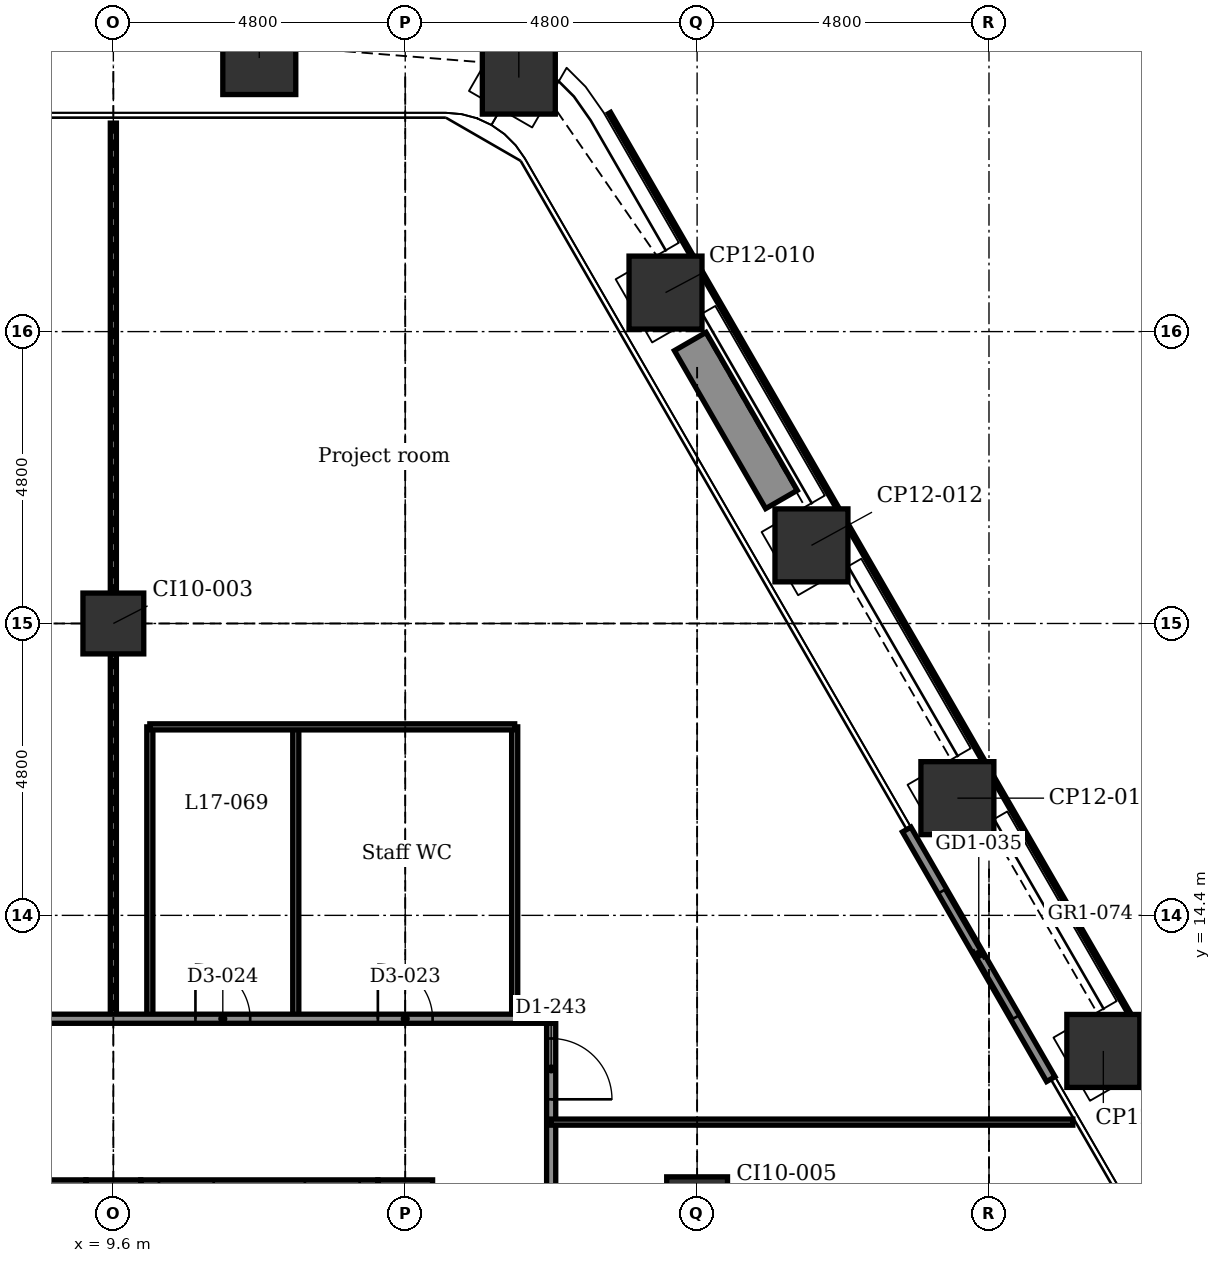
"""IFC4 building model, lengths in metres.
Left out: names, types, materials, properties, quantities, classifications, styles, units other than length and angle.
Written with IfcOpenShell. Run it as: python <this file> out.ifc"""

import sys

from ifc_helpers import new_model, si_unit, direction, frame, frame_2d, origin, origin_2d, place, context, subcontext, project, spatial, rectangle, extrude, element, fill, save


model = new_model("IFC4")
c1 = context("Model", 3, precision=1e-05, world=origin(), true_north=direction((0.0, 1.0)))
c2 = subcontext(c1, "Body", "Model", "MODEL_VIEW")
j1 = project(units=[si_unit("LENGTHUNIT", "METRE"), si_unit("PLANEANGLEUNIT", "RADIAN")], contexts=[c1])
p1 = place(None, origin())
s1 = spatial("IfcSite", under=j1, at=p1, CompositionType="ELEMENT")
p2 = place(p1, origin())
s2 = spatial("IfcBuilding", under=s1, at=p2, CompositionType="ELEMENT")
p3 = place(p2, frame((0.0, 0.0, 91.4)))
s3 = spatial("IfcBuildingStorey", under=s2, at=p3, CompositionType="ELEMENT", Elevation=91.4)
for number, where, z_axis, x_axis in (
    (1, (12.0, 28.499, -0.2), (0.0, 0.0, 1.0), (1.0, 0.0, 0.0)),
    (2, (16.268, 28.177, -0.2), (0.0, 0.0, 1.0), (0.5, 0.866, 0.0)),
    (3, (18.68, 24.642, -0.2), (0.0, 0.0, 1.0), (0.866, 0.5, 0.0)),
    (4, (21.08, 20.485, -0.2), (0.0, 0.0, 1.0), (0.866, 0.5, 0.0)),
    (5, (23.48, 16.328, -0.2), (0.0, 0.0, 1.0), (0.866, 0.5, 0.0)),
    (6, (25.88, 12.171, -0.2), (0.0, 0.0, 1.0), (0.866, 0.5, 0.0)),
):
    element("IfcColumn", number, at=place(p3, frame(where, z_axis=z_axis, x_axis=x_axis)), inside=s3, PredefinedType="COLUMN", context=c2, shape_type="SweptSolid", body=[
        extrude(rectangle(XDim=1.2, YDim=1.2, at=origin_2d()), origin(), (0.0, 0.0, 1.0), 4.5),
    ])
for number, where, z_axis, x_axis in (
    (7, (9.6, 19.2, -0.2), (0.0, 0.0, 1.0), (1.0, 0.0, 0.0)),
    (8, (19.2, 9.6, -0.2), (0.0, 0.0, 1.0), (1.0, 0.0, 0.0)),
):
    element("IfcColumn", number, at=place(p3, frame(where, z_axis=z_axis, x_axis=x_axis)), inside=s3, PredefinedType="COLUMN", context=c2, shape_type="SweptSolid", body=[
        extrude(rectangle(XDim=1.0, YDim=1.0, at=origin_2d()), origin(), (0.0, 0.0, 1.0), 4.5),
    ])
p4 = place(p3, frame((-5.25, 9.6, -0.2), z_axis=(0.0, 0.0, 1.0), x_axis=(1.0, 0.0, 0.0)))
e9 = element("IfcWall", 9, at=p4, inside=s3, PredefinedType="SHEAR", context=c2, shape_type="SweptSolid", body=[
    extrude(rectangle(XDim=14.4, YDim=0.9, at=frame_2d((7.2, 0.0))), origin(), (0.0, 0.0, 1.0), 4.5),
])
p5 = place(p4, frame((9.35, 0.0, 0.2)))
e10 = element("IfcOpeningElement", 10, at=p5, cuts=e9, PredefinedType="OPENING", context=c2, shape_type="SweptSolid", body=[
    extrude(rectangle(XDim=1.4, YDim=2.1, at=frame_2d((0.7, 1.05))), frame((0.0, 0.46, 0.0), z_axis=(0.0, -1.0, 0.0), x_axis=(1.0, 0.0, 0.0)), (0.0, 0.0, 1.0), 0.92),
])
p6 = place(p3, frame((10.05, 9.6, -0.2), z_axis=(0.0, 0.0, 1.0), x_axis=(1.0, 0.0, 0.0)))
e11 = element("IfcWall", 11, at=p6, inside=s3, PredefinedType="SHEAR", context=c2, shape_type="SweptSolid", body=[
    extrude(rectangle(XDim=3.9, YDim=0.9, at=frame_2d((1.95, 0.0))), origin(), (0.0, 0.0, 1.0), 4.5),
])
p7 = place(p6, frame((0.3, 0.0, 0.2)))
e12 = element("IfcOpeningElement", 12, at=p7, cuts=e11, PredefinedType="OPENING", context=c2, shape_type="SweptSolid", body=[
    extrude(rectangle(XDim=0.9, YDim=2.1, at=frame_2d((0.45, 1.05))), frame((0.0, 0.46, 0.0), z_axis=(0.0, -1.0, 0.0), x_axis=(1.0, 0.0, 0.0)), (0.0, 0.0, 1.0), 0.92),
])
p8 = place(p6, frame((2.7, 0.0, 0.2)))
e13 = element("IfcOpeningElement", 13, at=p8, cuts=e11, PredefinedType="OPENING", context=c2, shape_type="SweptSolid", body=[
    extrude(rectangle(XDim=0.9, YDim=2.1, at=frame_2d((0.45, 1.05))), frame((0.0, 0.46, 0.0), z_axis=(0.0, -1.0, 0.0), x_axis=(1.0, 0.0, 0.0)), (0.0, 0.0, 1.0), 0.92),
])
p9 = place(p3, frame((9.6, -10.15, -0.2), z_axis=(0.0, 0.0, 1.0), x_axis=(0.0, 1.0, 0.0)))
e14 = element("IfcWall", 14, at=p9, inside=s3, PredefinedType="SHEAR", context=c2, shape_type="SweptSolid", body=[
    extrude(rectangle(XDim=20.2, YDim=0.9, at=frame_2d((10.1, 0.0))), origin(), (0.0, 0.0, 1.0), 4.5),
])
p10 = place(p3, frame((14.4, -10.05, -0.2), z_axis=(0.0, 0.0, 1.0), x_axis=(0.0, 1.0, 0.0)))
e15 = element("IfcWall", 15, at=p10, inside=s3, PredefinedType="SHEAR", context=c2, shape_type="SweptSolid", body=[
    extrude(rectangle(XDim=20.1, YDim=0.9, at=frame_2d((10.05, 0.0))), origin(), (0.0, 0.0, 1.0), 4.5),
])
p11 = place(p10, frame((3.5, 0.0, 0.2)))
e16 = element("IfcOpeningElement", 16, at=p11, cuts=e15, PredefinedType="OPENING", context=c2, shape_type="SweptSolid", body=[
    extrude(rectangle(XDim=1.1, YDim=2.1, at=frame_2d((0.55, 1.05))), frame((0.0, 0.46, 0.0), z_axis=(0.0, -1.0, 0.0), x_axis=(1.0, 0.0, 0.0)), (0.0, 0.0, 1.0), 0.92),
])
p12 = place(p10, frame((5.9, 0.0, 0.2)))
e17 = element("IfcOpeningElement", 17, at=p12, cuts=e15, PredefinedType="OPENING", context=c2, shape_type="SweptSolid", body=[
    extrude(rectangle(XDim=1.1, YDim=2.1, at=frame_2d((0.55, 1.05))), frame((0.0, 0.46, 0.0), z_axis=(0.0, -1.0, 0.0), x_axis=(1.0, 0.0, 0.0)), (0.0, 0.0, 1.0), 0.92),
])
p13 = place(p10, frame((8.3, 0.0, 0.2)))
e18 = element("IfcOpeningElement", 18, at=p13, cuts=e15, PredefinedType="OPENING", context=c2, shape_type="SweptSolid", body=[
    extrude(rectangle(XDim=1.1, YDim=2.1, at=frame_2d((0.55, 1.05))), frame((0.0, 0.46, 0.0), z_axis=(0.0, -1.0, 0.0), x_axis=(1.0, 0.0, 0.0)), (0.0, 0.0, 1.0), 0.92),
])
p14 = place(p10, frame((10.7, 0.0, 0.2)))
e19 = element("IfcOpeningElement", 19, at=p14, cuts=e15, PredefinedType="OPENING", context=c2, shape_type="SweptSolid", body=[
    extrude(rectangle(XDim=1.1, YDim=2.1, at=frame_2d((0.55, 1.05))), frame((0.0, 0.46, 0.0), z_axis=(0.0, -1.0, 0.0), x_axis=(1.0, 0.0, 0.0)), (0.0, 0.0, 1.0), 0.92),
])
p15 = place(p3, frame((22.647, 15.812, 0.0), z_axis=(0.0, 0.0, 1.0), x_axis=(0.499978080042, -0.866038058908, 0.0)))
e20 = element("IfcWall", 20, at=p15, inside=s3, PredefinedType="PARTITIONING", context=c2, shape_type="SweptSolid", body=[
    extrude(rectangle(XDim=4.74, YDim=0.16, at=frame_2d((2.37, 0.0))), origin(), (0.0, 0.0, 1.0), 4.3),
])
p16 = place(p15, frame((1.17, 0.0, 0.0)))
e21 = element("IfcOpeningElement", 21, at=p16, cuts=e20, PredefinedType="OPENING", context=c2, shape_type="SweptSolid", body=[
    extrude(rectangle(XDim=2.4, YDim=2.4, at=frame_2d((1.2, 1.2))), frame((0.0, 0.09, 0.0), z_axis=(0.0, -1.0, 0.0), x_axis=(1.0, 0.0, 0.0)), (0.0, 0.0, 1.0), 0.18),
])
p17 = place(p3, frame((19.087, 23.837, 0.0), z_axis=(0.0, 0.0, 1.0), x_axis=(0.499990139034, -0.866031096941, 0.0)))
e22 = element("IfcWall", 22, at=p17, inside=s3, PredefinedType="USERDEFINED", context=c2, shape_type="SweptSolid", body=[
    extrude(rectangle(XDim=3.0, YDim=0.6, at=frame_2d((1.5, 0.0))), origin(), (0.0, 0.0, 1.0), 0.7),
])
p18 = place(p3, frame((16.8, 3.95, 0.0), z_axis=(0.0, 0.0, 1.0), x_axis=(0.0, 1.0, 0.0)))
e23 = element("IfcWall", 23, at=p18, inside=s3, PredefinedType="PARTITIONING", context=c2, shape_type="SweptSolid", body=[
    extrude(rectangle(XDim=8.75, YDim=0.15, at=frame_2d((4.375, 0.0))), origin(), (0.0, 0.0, 1.0), 4.3),
])
p19 = place(p18, frame((7.425, 0.0, 0.0)))
e24 = element("IfcOpeningElement", 24, at=p19, cuts=e23, PredefinedType="OPENING", context=c2, shape_type="SweptSolid", body=[
    extrude(rectangle(XDim=1.0, YDim=2.1, at=frame_2d((0.5, 1.05))), frame((0.0, 0.085, 0.0), z_axis=(0.0, -1.0, 0.0), x_axis=(1.0, 0.0, 0.0)), (0.0, 0.0, 1.0), 0.17),
])
p20 = place(p18, frame((0.885, 0.0, 0.0)))
e25 = element("IfcOpeningElement", 25, at=p20, cuts=e23, PredefinedType="OPENING", context=c2, shape_type="SweptSolid", body=[
    extrude(rectangle(XDim=1.0, YDim=2.1, at=frame_2d((0.5, 1.05))), frame((0.0, 0.085, 0.0), z_axis=(0.0, -1.0, 0.0), x_axis=(1.0, 0.0, 0.0)), (0.0, 0.0, 1.0), 0.17),
])
for number, where, z_axis, x_axis in (
    (26, (16.2, 12.7, 0.0), (0.0, 0.0, 1.0), (0.0, 1.0, 0.0)),
    (27, (12.6, 12.7, 0.0), (0.0, 0.0, 1.0), (0.0, 1.0, 0.0)),
    (28, (10.2, 12.7, 0.0), (0.0, 0.0, 1.0), (0.0, 1.0, 0.0)),
):
    element("IfcWall", number, at=place(p3, frame(where, z_axis=z_axis, x_axis=x_axis)), inside=s3, PredefinedType="PARTITIONING", context=c2, shape_type="SweptSolid", body=[
        extrude(rectangle(XDim=4.8, YDim=0.1, at=frame_2d((2.4, 0.0))), origin(), (0.0, 0.0, 1.0), 4.3),
    ])
p21 = place(p3, frame((9.6, 12.7, 0.0), z_axis=(0.0, 0.0, 1.0), x_axis=(0.0, 1.0, 0.0)))
e29 = element("IfcWall", 29, at=p21, inside=s3, PredefinedType="PARTITIONING", context=c2, shape_type="SweptSolid", body=[
    extrude(rectangle(XDim=6.0, YDim=0.1, at=frame_2d((3.0, 0.0))), origin(), (0.0, 0.0, 1.0), 3.843),
])
p22 = place(p3, frame((9.6, 19.7, 0.0), z_axis=(0.0, 0.0, 1.0), x_axis=(0.0, 1.0, 0.0)))
e30 = element("IfcWall", 30, at=p22, inside=s3, PredefinedType="PARTITIONING", context=c2, shape_type="SweptSolid", body=[
    extrude(rectangle(XDim=7.729, YDim=0.1, at=frame_2d((3.864, 0.0))), origin(), (0.0, 0.0, 1.0), 3.843),
])
p23 = place(p3, frame((16.8, 11.0, 0.0), z_axis=(0.0, 0.0, 1.0), x_axis=(1.0, 0.0, 0.0)))
e31 = element("IfcWall", 31, at=p23, inside=s3, PredefinedType="PARTITIONING", context=c2, shape_type="SweptSolid", body=[
    extrude(rectangle(XDim=8.578, YDim=0.1, at=frame_2d((4.289, 0.0))), origin(), (0.0, 0.0, 1.0), 4.3),
])
p24 = place(p3, frame((-16.8, 12.7, 0.0), z_axis=(0.0, 0.0, 1.0), x_axis=(1.0, 0.0, 0.0)))
e32 = element("IfcWall", 32, at=p24, inside=s3, PredefinedType="PARTITIONING", context=c2, shape_type="SweptSolid", body=[
    extrude(rectangle(XDim=33.6, YDim=0.15, at=frame_2d((16.8, 0.0))), origin(), (0.0, 0.0, 1.0), 4.3),
])
p25 = place(p24, frame((0.625, 0.0, 0.0)))
e33 = element("IfcOpeningElement", 33, at=p25, cuts=e32, PredefinedType="OPENING", context=c2, shape_type="SweptSolid", body=[
    extrude(rectangle(XDim=1.0, YDim=2.1, at=frame_2d((0.5, 1.05))), frame((0.0, 0.085, 0.0), z_axis=(0.0, -1.0, 0.0), x_axis=(1.0, 0.0, 0.0)), (0.0, 0.0, 1.0), 0.17),
])
p26 = place(p24, frame((4.3, 0.0, 0.0)))
e34 = element("IfcOpeningElement", 34, at=p26, cuts=e32, PredefinedType="OPENING", context=c2, shape_type="SweptSolid", body=[
    extrude(rectangle(XDim=1.0, YDim=2.1, at=frame_2d((0.5, 1.05))), frame((0.0, 0.085, 0.0), z_axis=(0.0, -1.0, 0.0), x_axis=(1.0, 0.0, 0.0)), (0.0, 0.0, 1.0), 0.17),
])
p27 = place(p24, frame((10.3, 0.0, 0.0)))
e35 = element("IfcOpeningElement", 35, at=p27, cuts=e32, PredefinedType="OPENING", context=c2, shape_type="SweptSolid", body=[
    extrude(rectangle(XDim=1.0, YDim=2.1, at=frame_2d((0.5, 1.05))), frame((0.0, 0.085, 0.0), z_axis=(0.0, -1.0, 0.0), x_axis=(1.0, 0.0, 0.0)), (0.0, 0.0, 1.0), 0.17),
])
p28 = place(p24, frame((14.975, 0.0, 0.0)))
e36 = element("IfcOpeningElement", 36, at=p28, cuts=e32, PredefinedType="OPENING", context=c2, shape_type="SweptSolid", body=[
    extrude(rectangle(XDim=1.0, YDim=2.1, at=frame_2d((0.5, 1.05))), frame((0.0, 0.085, 0.0), z_axis=(0.0, -1.0, 0.0), x_axis=(1.0, 0.0, 0.0)), (0.0, 0.0, 1.0), 0.17),
])
p29 = place(p24, frame((18.7, 0.0, 0.0)))
e37 = element("IfcOpeningElement", 37, at=p29, cuts=e32, PredefinedType="OPENING", context=c2, shape_type="SweptSolid", body=[
    extrude(rectangle(XDim=1.0, YDim=2.1, at=frame_2d((0.5, 1.05))), frame((0.0, 0.085, 0.0), z_axis=(0.0, -1.0, 0.0), x_axis=(1.0, 0.0, 0.0)), (0.0, 0.0, 1.0), 0.17),
])
p30 = place(p24, frame((22.485, 0.0, 0.0)))
e38 = element("IfcOpeningElement", 38, at=p30, cuts=e32, PredefinedType="OPENING", context=c2, shape_type="SweptSolid", body=[
    extrude(rectangle(XDim=1.0, YDim=2.1, at=frame_2d((0.5, 1.05))), frame((0.0, 0.085, 0.0), z_axis=(0.0, -1.0, 0.0), x_axis=(1.0, 0.0, 0.0)), (0.0, 0.0, 1.0), 0.17),
])
p31 = place(p24, frame((30.75, 0.0, 0.0)))
e39 = element("IfcOpeningElement", 39, at=p31, cuts=e32, PredefinedType="OPENING", context=c2, shape_type="SweptSolid", body=[
    extrude(rectangle(XDim=0.9, YDim=2.1, at=frame_2d((0.45, 1.05))), frame((0.0, 0.085, 0.0), z_axis=(0.0, -1.0, 0.0), x_axis=(1.0, 0.0, 0.0)), (0.0, 0.0, 1.0), 0.17),
])
p32 = place(p24, frame((27.75, 0.0, 0.0)))
e40 = element("IfcOpeningElement", 40, at=p32, cuts=e32, PredefinedType="OPENING", context=c2, shape_type="SweptSolid", body=[
    extrude(rectangle(XDim=0.9, YDim=2.1, at=frame_2d((0.45, 1.05))), frame((0.0, 0.085, 0.0), z_axis=(0.0, -1.0, 0.0), x_axis=(1.0, 0.0, 0.0)), (0.0, 0.0, 1.0), 0.17),
])
p33 = place(p3, frame((10.2, 17.5, 0.0), z_axis=(0.0, 0.0, 1.0), x_axis=(1.0, 0.0, 0.0)))
e41 = element("IfcWall", 41, at=p33, inside=s3, PredefinedType="PARTITIONING", context=c2, shape_type="SweptSolid", body=[
    extrude(rectangle(XDim=6.0, YDim=0.1, at=frame_2d((3.0, 0.0))), origin(), (0.0, 0.0, 1.0), 4.3),
])
p34 = place(p16, origin())
e42 = element("IfcDoor", 42, at=p34, inside=s3, OperationType="DOUBLE_DOOR_SLIDING", PredefinedType="DOOR", context=c2, shape_type="SweptSolid", body=[
    extrude(rectangle(XDim=2.4, YDim=2.4, at=frame_2d((1.2, 1.2))), frame((0.0, 0.025, 0.0), z_axis=(0.0, -1.0, 0.0), x_axis=(1.0, 0.0, 0.0)), (0.0, 0.0, 1.0), 0.05),
])
fill(e21, e42)
p35 = place(p19, frame((1.0, 0.0, 0.0), z_axis=(0.0, 0.0, 1.0), x_axis=(-1.0, 0.0, 0.0)))
e43 = element("IfcDoor", 43, at=p35, inside=s3, OperationType="SINGLE_SWING_LEFT", PredefinedType="DOOR", context=c2, shape_type="SweptSolid", body=[
    extrude(rectangle(XDim=1.0, YDim=2.1, at=frame_2d((0.5, 1.05))), frame((0.0, 0.025, 0.0), z_axis=(0.0, -1.0, 0.0), x_axis=(1.0, 0.0, 0.0)), (0.0, 0.0, 1.0), 0.05),
])
fill(e24, e43)
p36 = place(p31, origin())
e44 = element("IfcDoor", 44, at=p36, inside=s3, OperationType="SINGLE_SWING_LEFT", PredefinedType="DOOR", context=c2, shape_type="SweptSolid", body=[
    extrude(rectangle(XDim=0.9, YDim=2.1, at=frame_2d((0.45, 1.05))), frame((0.0, 0.025, 0.0), z_axis=(0.0, -1.0, 0.0), x_axis=(1.0, 0.0, 0.0)), (0.0, 0.0, 1.0), 0.05),
])
fill(e39, e44)
p37 = place(p32, origin())
e45 = element("IfcDoor", 45, at=p37, inside=s3, OperationType="SINGLE_SWING_LEFT", PredefinedType="DOOR", context=c2, shape_type="SweptSolid", body=[
    extrude(rectangle(XDim=0.9, YDim=2.1, at=frame_2d((0.45, 1.05))), frame((0.0, 0.025, 0.0), z_axis=(0.0, -1.0, 0.0), x_axis=(1.0, 0.0, 0.0)), (0.0, 0.0, 1.0), 0.05),
])
fill(e40, e45)
save(model, sys.argv[1])
